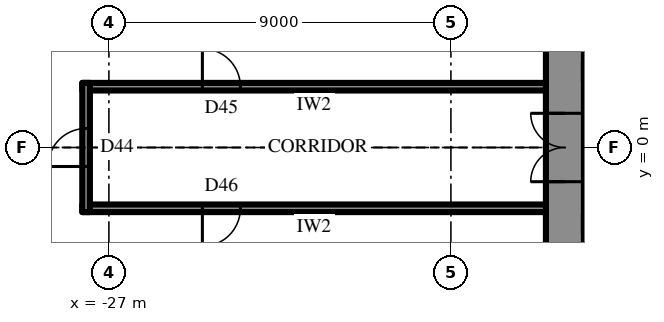
"""IFC4 building model, lengths in metres.
Left out: names, types, materials, properties, quantities, classifications, styles, units other than length and angle.
Written with IfcOpenShell. Run it as: python <this file> out.ifc"""

import sys

from ifc_helpers import new_model, si_unit, direction, frame, frame_2d, origin, place, context, subcontext, project, spatial, rectangle, extrude, element, fill, save


model = new_model("IFC4")
c1 = context("Model", 3, precision=1e-05, world=origin(), true_north=direction((0.0, 1.0)))
c2 = subcontext(c1, "Body", "Model", "MODEL_VIEW")
j1 = project(units=[si_unit("LENGTHUNIT", "METRE"), si_unit("PLANEANGLEUNIT", "RADIAN")], contexts=[c1])
p1 = place(None, origin())
s1 = spatial("IfcSite", under=j1, at=p1, CompositionType="ELEMENT")
p2 = place(p1, origin())
s2 = spatial("IfcBuilding", under=s1, at=p2, CompositionType="ELEMENT")
p3 = place(p2, frame((0.0, 0.0, 270.1)))
s3 = spatial("IfcBuildingStorey", under=s2, at=p3, CompositionType="ELEMENT", Elevation=270.1)
p4 = place(p3, frame((-15.0, 10.7, 0.0), z_axis=(0.0, 0.0, 1.0), x_axis=(0.0, -1.0, 0.0)))
e1 = element("IfcWall", 1, at=p4, inside=s3, PredefinedType="SHEAR", context=c2, shape_type="SweptSolid", body=[
    extrude(rectangle(XDim=21.4, YDim=1.0, at=frame_2d((10.7, 0.0))), origin(), (0.0, 0.0, 1.0), 4.2),
])
p5 = place(p4, frame((9.8, 0.0, 0.0)))
e2 = element("IfcOpeningElement", 2, at=p5, cuts=e1, PredefinedType="OPENING", context=c2, shape_type="SweptSolid", body=[
    extrude(rectangle(XDim=1.8, YDim=2.4, at=frame_2d((0.9, 1.2))), frame((0.0, 0.51, 0.0), z_axis=(0.0, -1.0, 0.0), x_axis=(1.0, 0.0, 0.0)), (0.0, 0.0, 1.0), 1.02),
])
p6 = place(p3, frame((-12.3, -2.0, 0.0), z_axis=(0.0, 0.0, 1.0), x_axis=(-1.0, 0.0, 0.0)))
e3 = element("IfcWall", 3, at=p6, inside=s3, PredefinedType="SHEAR", context=c2, shape_type="SweptSolid", body=[
    extrude(rectangle(XDim=2.2, YDim=0.5, at=frame_2d((1.1, 0.0))), origin(), (0.0, 0.0, 1.0), 4.2),
])
p7 = place(p6, frame((0.8, 0.0, 0.0)))
e4 = element("IfcOpeningElement", 4, at=p7, cuts=e3, PredefinedType="OPENING", context=c2, shape_type="SweptSolid", body=[
    extrude(rectangle(XDim=0.9, YDim=2.2, at=frame_2d((0.45, 1.1))), frame((0.0, 0.26, 0.0), z_axis=(0.0, -1.0, 0.0), x_axis=(1.0, 0.0, 0.0)), (0.0, 0.0, 1.0), 0.52),
])
p8 = place(p3, frame((-15.5, 1.6, 0.0), z_axis=(0.0, 0.0, 1.0), x_axis=(-1.0, 0.0, 0.0)))
e5 = element("IfcWall", 5, at=p8, inside=s3, PredefinedType="PARTITIONING", context=c2, shape_type="SweptSolid", body=[
    extrude(rectangle(XDim=12.2, YDim=0.2, at=frame_2d((6.1, 0.0))), origin(), (0.0, 0.0, 1.0), 4.0),
])
p9 = place(p8, frame((8.04, 0.0, 0.0)))
e6 = element("IfcOpeningElement", 6, at=p9, cuts=e5, PredefinedType="OPENING", context=c2, shape_type="SweptSolid", body=[
    extrude(rectangle(XDim=1.0, YDim=2.2, at=frame_2d((0.5, 1.1))), frame((0.0, 0.11, 0.0), z_axis=(0.0, -1.0, 0.0), x_axis=(1.0, 0.0, 0.0)), (0.0, 0.0, 1.0), 0.22),
])
p10 = place(p3, frame((-15.5, -1.6, 0.0), z_axis=(0.0, 0.0, 1.0), x_axis=(-1.0, 0.0, 0.0)))
e7 = element("IfcWall", 7, at=p10, inside=s3, PredefinedType="PARTITIONING", context=c2, shape_type="SweptSolid", body=[
    extrude(rectangle(XDim=12.2, YDim=0.2, at=frame_2d((6.1, 0.0))), origin(), (0.0, 0.0, 1.0), 4.0),
])
p11 = place(p10, frame((8.04, 0.0, 0.0)))
e8 = element("IfcOpeningElement", 8, at=p11, cuts=e7, PredefinedType="OPENING", context=c2, shape_type="SweptSolid", body=[
    extrude(rectangle(XDim=1.0, YDim=2.2, at=frame_2d((0.5, 1.1))), frame((0.0, 0.11, 0.0), z_axis=(0.0, -1.0, 0.0), x_axis=(1.0, 0.0, 0.0)), (0.0, 0.0, 1.0), 0.22),
])
p12 = place(p3, frame((-27.6, -1.7, 0.0), z_axis=(0.0, 0.0, 1.0), x_axis=(0.0, 1.0, 0.0)))
e9 = element("IfcWall", 9, at=p12, inside=s3, PredefinedType="PARTITIONING", context=c2, shape_type="SweptSolid", body=[
    extrude(rectangle(XDim=3.4, YDim=0.2, at=frame_2d((1.7, 0.0))), origin(), (0.0, 0.0, 1.0), 4.0),
])
p13 = place(p12, frame((1.2, 0.0, 0.0)))
e10 = element("IfcOpeningElement", 10, at=p13, cuts=e9, PredefinedType="OPENING", context=c2, shape_type="SweptSolid", body=[
    extrude(rectangle(XDim=1.0, YDim=2.2, at=frame_2d((0.5, 1.1))), frame((0.0, 0.11, 0.0), z_axis=(0.0, -1.0, 0.0), x_axis=(1.0, 0.0, 0.0)), (0.0, 0.0, 1.0), 0.22),
])
p14 = place(p5, frame((1.8, 0.0, 0.0), z_axis=(0.0, 0.0, 1.0), x_axis=(-1.0, 0.0, 0.0)))
e11 = element("IfcDoor", 11, at=p14, inside=s3, OperationType="DOUBLE_DOOR_SINGLE_SWING", PredefinedType="DOOR", context=c2, shape_type="SweptSolid", body=[
    extrude(rectangle(XDim=1.8, YDim=2.4, at=frame_2d((0.9, 1.2))), frame((0.0, 0.025, 0.0), z_axis=(0.0, -1.0, 0.0), x_axis=(1.0, 0.0, 0.0)), (0.0, 0.0, 1.0), 0.05),
])
fill(e2, e11)
p15 = place(p9, frame((1.0, 0.0, 0.0), z_axis=(0.0, 0.0, 1.0), x_axis=(-1.0, 0.0, 0.0)))
e12 = element("IfcDoor", 12, at=p15, inside=s3, OperationType="SINGLE_SWING_RIGHT", PredefinedType="DOOR", context=c2, shape_type="SweptSolid", body=[
    extrude(rectangle(XDim=1.0, YDim=2.2, at=frame_2d((0.5, 1.1))), frame((0.0, 0.025, 0.0), z_axis=(0.0, -1.0, 0.0), x_axis=(1.0, 0.0, 0.0)), (0.0, 0.0, 1.0), 0.05),
])
fill(e6, e12)
p16 = place(p11, origin())
e13 = element("IfcDoor", 13, at=p16, inside=s3, OperationType="SINGLE_SWING_LEFT", PredefinedType="DOOR", context=c2, shape_type="SweptSolid", body=[
    extrude(rectangle(XDim=1.0, YDim=2.2, at=frame_2d((0.5, 1.1))), frame((0.0, 0.025, 0.0), z_axis=(0.0, -1.0, 0.0), x_axis=(1.0, 0.0, 0.0)), (0.0, 0.0, 1.0), 0.05),
])
fill(e8, e13)
p17 = place(p13, origin())
e14 = element("IfcDoor", 14, at=p17, inside=s3, OperationType="SINGLE_SWING_RIGHT", PredefinedType="DOOR", context=c2, shape_type="SweptSolid", body=[
    extrude(rectangle(XDim=1.0, YDim=2.2, at=frame_2d((0.5, 1.1))), frame((0.0, 0.025, 0.0), z_axis=(0.0, -1.0, 0.0), x_axis=(1.0, 0.0, 0.0)), (0.0, 0.0, 1.0), 0.05),
])
fill(e10, e14)
save(model, sys.argv[1])
